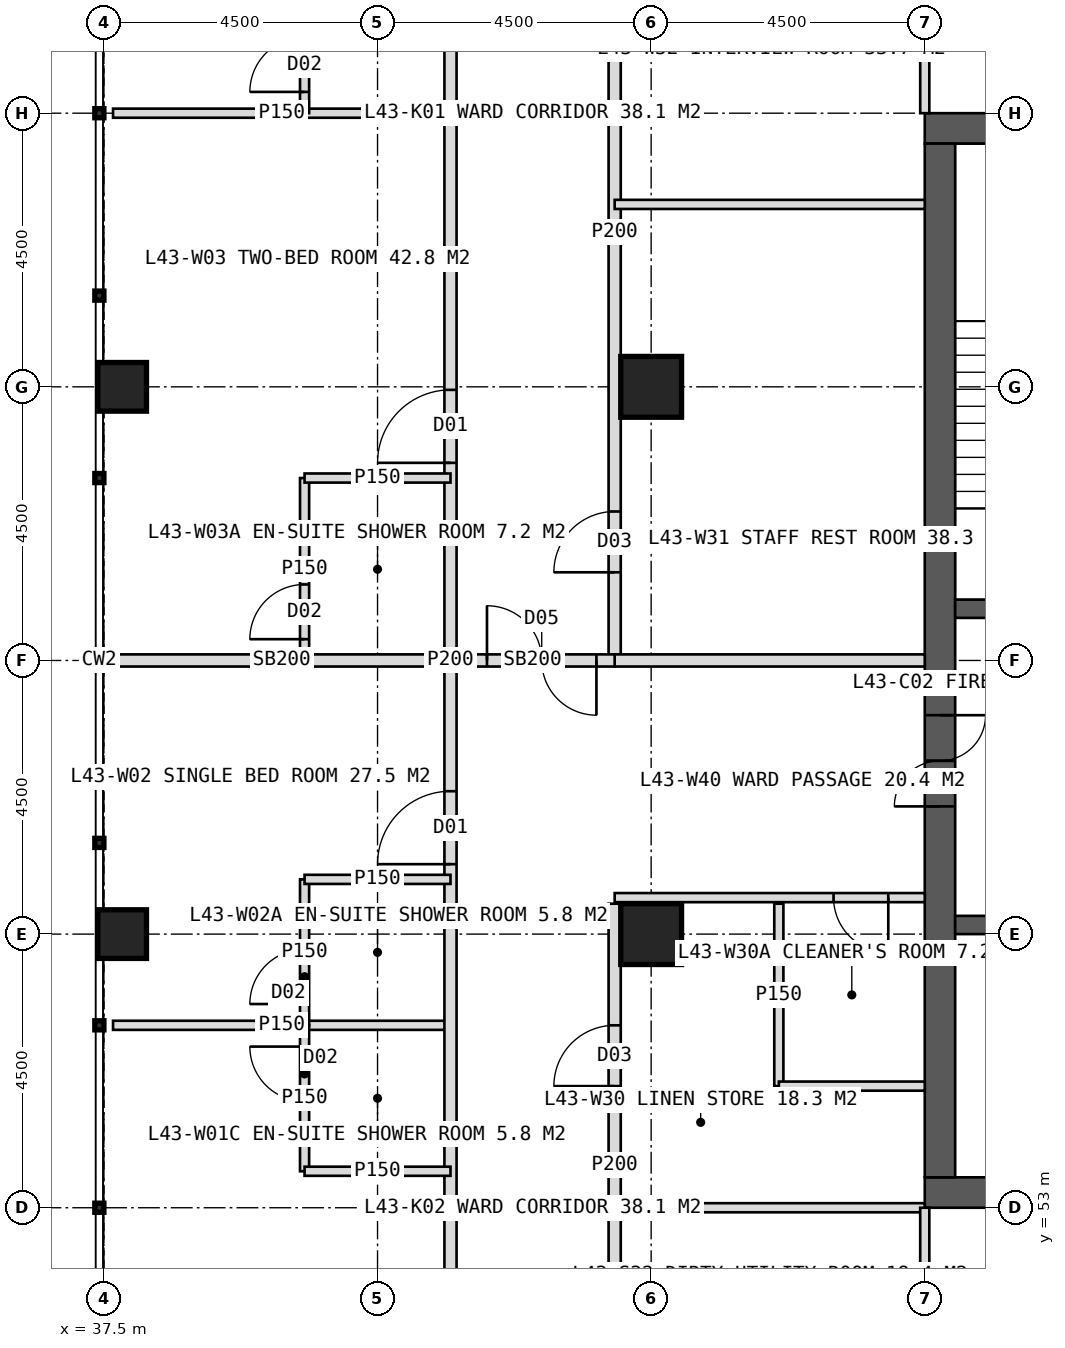
"""IFC4 building model, lengths in metres.
Left out: names, types, materials, properties, quantities, classifications, styles, units other than length and angle.
Written with IfcOpenShell. Run it as: python <this file> out.ifc"""

import sys

from ifc_helpers import new_model, si_unit, direction, frame, frame_2d, origin, origin_2d, place, context, subcontext, project, spatial, rectangle, hollow_rectangle, extrude, element, fill, save


model = new_model("IFC4")
c1 = context("Model", 3, precision=1e-05, world=origin(), true_north=direction((0.0, 1.0)))
c2 = subcontext(c1, "Body", "Model", "MODEL_VIEW")
j1 = project(units=[si_unit("LENGTHUNIT", "METRE"), si_unit("PLANEANGLEUNIT", "RADIAN")], contexts=[c1])
p1 = place(None, origin())
s1 = spatial("IfcSite", under=j1, at=p1, CompositionType="ELEMENT")
p2 = place(p1, origin())
s2 = spatial("IfcBuilding", under=s1, at=p2, CompositionType="ELEMENT")
p3 = place(p2, frame((0.0, 0.0, 181.0)))
s3 = spatial("IfcBuildingStorey", under=s2, at=p3, CompositionType="ELEMENT", Elevation=181.0)
p4 = place(p3, frame((51.0, 70.75, 0.0), z_axis=(0.0, 0.0, 1.0), x_axis=(1.0, 0.0, 0.0)))
e1 = element("IfcWall", 1, at=p4, inside=s3, PredefinedType="SHEAR", context=c2, shape_type="SweptSolid", body=[
    extrude(rectangle(XDim=18.0, YDim=0.5, at=frame_2d((9.0, 0.0))), origin(), (0.0, 0.0, 1.0), 4.0),
])
p5 = place(p4, frame((8.1, 0.0, 0.0)))
e2 = element("IfcOpeningElement", 2, at=p5, cuts=e1, PredefinedType="OPENING", context=c2, shape_type="SweptSolid", body=[
    extrude(rectangle(XDim=1.8, YDim=2.2, at=frame_2d((0.9, 1.1))), frame((0.0, 0.26, 0.0), z_axis=(0.0, -1.0, 0.0), x_axis=(1.0, 0.0, 0.0)), (0.0, 0.0, 1.0), 0.52),
])
p6 = place(p3, frame((51.0, 53.25, 0.0), z_axis=(0.0, 0.0, 1.0), x_axis=(1.0, 0.0, 0.0)))
e3 = element("IfcWall", 3, at=p6, inside=s3, PredefinedType="SHEAR", context=c2, shape_type="SweptSolid", body=[
    extrude(rectangle(XDim=18.0, YDim=0.5, at=frame_2d((9.0, 0.0))), origin(), (0.0, 0.0, 1.0), 4.0),
])
p7 = place(p6, frame((8.1, 0.0, 0.0)))
e4 = element("IfcOpeningElement", 4, at=p7, cuts=e3, PredefinedType="OPENING", context=c2, shape_type="SweptSolid", body=[
    extrude(rectangle(XDim=1.8, YDim=2.2, at=frame_2d((0.9, 1.1))), frame((0.0, 0.26, 0.0), z_axis=(0.0, -1.0, 0.0), x_axis=(1.0, 0.0, 0.0)), (0.0, 0.0, 1.0), 0.52),
])
p8 = place(p3, frame((51.25, 53.5, 0.0), z_axis=(0.0, 0.0, 1.0), x_axis=(0.0, 1.0, 0.0)))
e5 = element("IfcWall", 5, at=p8, inside=s3, PredefinedType="SHEAR", context=c2, shape_type="SweptSolid", body=[
    extrude(rectangle(XDim=17.0, YDim=0.5, at=frame_2d((8.5, 0.0))), origin(), (0.0, 0.0, 1.0), 4.0),
])
p9 = place(p8, frame((6.1, 0.0, 0.0)))
e6 = element("IfcOpeningElement", 6, at=p9, cuts=e5, PredefinedType="OPENING", context=c2, shape_type="SweptSolid", body=[
    extrude(rectangle(XDim=1.5, YDim=2.2, at=frame_2d((0.75, 1.1))), frame((0.0, 0.26, 0.0), z_axis=(0.0, -1.0, 0.0), x_axis=(1.0, 0.0, 0.0)), (0.0, 0.0, 1.0), 0.52),
])
p10 = place(p3, frame((51.5, 62.85, 0.0), z_axis=(0.0, 0.0, 1.0), x_axis=(1.0, 0.0, 0.0)))
e7 = element("IfcWall", 7, at=p10, inside=s3, PredefinedType="SHEAR", context=c2, shape_type="SweptSolid", body=[
    extrude(rectangle(XDim=3.3, YDim=0.3, at=frame_2d((1.65, 0.0))), origin(), (0.0, 0.0, 1.0), 4.0),
])
p11 = place(p10, frame((1.15, 0.0, 0.0)))
e8 = element("IfcOpeningElement", 8, at=p11, cuts=e7, PredefinedType="OPENING", context=c2, shape_type="SweptSolid", body=[
    extrude(rectangle(XDim=1.2, YDim=2.1, at=frame_2d((0.6, 1.05))), frame((0.0, 0.16, 0.0), z_axis=(0.0, -1.0, 0.0), x_axis=(1.0, 0.0, 0.0)), (0.0, 0.0, 1.0), 0.32),
])
p12 = place(p3, frame((51.5, 57.65, 0.0), z_axis=(0.0, 0.0, 1.0), x_axis=(1.0, 0.0, 0.0)))
e9 = element("IfcWall", 9, at=p12, inside=s3, PredefinedType="SHEAR", context=c2, shape_type="SweptSolid", body=[
    extrude(rectangle(XDim=3.3, YDim=0.3, at=frame_2d((1.65, 0.0))), origin(), (0.0, 0.0, 1.0), 4.0),
])
p13 = place(p12, frame((1.15, 0.0, 0.0)))
e10 = element("IfcOpeningElement", 10, at=p13, cuts=e9, PredefinedType="OPENING", context=c2, shape_type="SweptSolid", body=[
    extrude(rectangle(XDim=1.2, YDim=2.2, at=frame_2d((0.6, 1.1))), frame((0.0, 0.16, 0.0), z_axis=(0.0, -1.0, 0.0), x_axis=(1.0, 0.0, 0.0)), (0.0, 0.0, 1.0), 0.32),
])
for number, where, z_axis, x_axis in (
    (11, (46.5, 57.5, 0.0), (0.0, 0.0, 1.0), (1.0, 0.0, 0.0)),
    (12, (46.5, 66.5, 0.0), (0.0, 0.0, 1.0), (1.0, 0.0, 0.0)),
):
    element("IfcColumn", number, at=place(p3, frame(where, z_axis=z_axis, x_axis=x_axis)), inside=s3, PredefinedType="COLUMN", context=c2, shape_type="SweptSolid", body=[
        extrude(hollow_rectangle(XDim=1.0, YDim=1.0, WallThickness=0.1, at=origin_2d()), origin(), (0.0, 0.0, 1.0), 4.0),
    ])
for number, where, z_axis, x_axis in (
    (13, (37.8, 57.5, 0.0), (0.0, 0.0, 1.0), (1.0, 0.0, 0.0)),
    (14, (37.8, 66.5, 0.0), (0.0, 0.0, 1.0), (1.0, 0.0, 0.0)),
):
    element("IfcColumn", number, at=place(p3, frame(where, z_axis=z_axis, x_axis=x_axis)), inside=s3, PredefinedType="COLUMN", context=c2, shape_type="SweptSolid", body=[
        extrude(hollow_rectangle(XDim=0.8, YDim=0.8, WallThickness=0.08, at=origin_2d()), origin(), (0.0, 0.0, 1.0), 4.0),
    ])
p14 = place(p3, frame((51.0, 71.0, 0.0), z_axis=(0.0, 0.0, 1.0), x_axis=(0.0, 1.0, 0.0)))
e15 = element("IfcWall", 15, at=p14, inside=s3, PredefinedType="PARTITIONING", context=c2, shape_type="SweptSolid", body=[
    extrude(rectangle(XDim=5.1, YDim=0.15, at=frame_2d((2.55, 0.0))), origin(), (0.0, 0.0, 1.0), 3.75),
])
p15 = place(p3, frame((43.2, 56.0, 0.0), z_axis=(0.0, 0.0, 1.0), x_axis=(-1.0, 0.0, 0.0)))
e16 = element("IfcWall", 16, at=p15, inside=s3, PredefinedType="PARTITIONING", context=c2, shape_type="SweptSolid", body=[
    extrude(rectangle(XDim=5.55, YDim=0.15, at=frame_2d((2.775, 0.0))), origin(), (0.0, 0.0, 1.0), 3.75),
])
p16 = place(p3, frame((43.2, 62.0, 0.0), z_axis=(0.0, 0.0, 1.0), x_axis=(-1.0, 0.0, 0.0)))
e17 = element("IfcWall", 17, at=p16, inside=s3, PredefinedType="SOLIDWALL", context=c2, shape_type="SweptSolid", body=[
    extrude(rectangle(XDim=5.55, YDim=0.2, at=frame_2d((2.775, 0.0))), origin(), (0.0, 0.0, 1.0), 2.95),
])
p17 = place(p3, frame((43.2, 71.0, 0.0), z_axis=(0.0, 0.0, 1.0), x_axis=(-1.0, 0.0, 0.0)))
e18 = element("IfcWall", 18, at=p17, inside=s3, PredefinedType="PARTITIONING", context=c2, shape_type="SweptSolid", body=[
    extrude(rectangle(XDim=5.55, YDim=0.15, at=frame_2d((2.775, 0.0))), origin(), (0.0, 0.0, 1.0), 3.75),
])
p18 = place(p3, frame((43.2, 45.2, 0.0), z_axis=(0.0, 0.0, 1.0), x_axis=(0.0, 1.0, 0.0)))
e19 = element("IfcWall", 19, at=p18, inside=s3, PredefinedType="PARTITIONING", context=c2, shape_type="SweptSolid", body=[
    extrude(rectangle(XDim=33.6, YDim=0.2, at=frame_2d((16.8, 0.0))), origin(), (0.0, 0.0, 1.0), 3.75),
])
p19 = place(p18, frame((2.65, 0.0, 0.0)))
e20 = element("IfcOpeningElement", 20, at=p19, cuts=e19, PredefinedType="OPENING", context=c2, shape_type="SweptSolid", body=[
    extrude(rectangle(XDim=1.2, YDim=2.2, at=frame_2d((0.6, 1.1))), frame((0.0, 0.11, 0.0), z_axis=(0.0, -1.0, 0.0), x_axis=(1.0, 0.0, 0.0)), (0.0, 0.0, 1.0), 0.22),
])
p20 = place(p18, frame((13.45, 0.0, 0.0)))
e21 = element("IfcOpeningElement", 21, at=p20, cuts=e19, PredefinedType="OPENING", context=c2, shape_type="SweptSolid", body=[
    extrude(rectangle(XDim=1.2, YDim=2.2, at=frame_2d((0.6, 1.1))), frame((0.0, 0.11, 0.0), z_axis=(0.0, -1.0, 0.0), x_axis=(1.0, 0.0, 0.0)), (0.0, 0.0, 1.0), 0.22),
])
p21 = place(p18, frame((20.05, 0.0, 0.0)))
e22 = element("IfcOpeningElement", 22, at=p21, cuts=e19, PredefinedType="OPENING", context=c2, shape_type="SweptSolid", body=[
    extrude(rectangle(XDim=1.2, YDim=2.2, at=frame_2d((0.6, 1.1))), frame((0.0, 0.11, 0.0), z_axis=(0.0, -1.0, 0.0), x_axis=(1.0, 0.0, 0.0)), (0.0, 0.0, 1.0), 0.22),
])
p22 = place(p18, frame((29.05, 0.0, 0.0)))
e23 = element("IfcOpeningElement", 23, at=p22, cuts=e19, PredefinedType="OPENING", context=c2, shape_type="SweptSolid", body=[
    extrude(rectangle(XDim=1.2, YDim=2.2, at=frame_2d((0.6, 1.1))), frame((0.0, 0.11, 0.0), z_axis=(0.0, -1.0, 0.0), x_axis=(1.0, 0.0, 0.0)), (0.0, 0.0, 1.0), 0.22),
])
p23 = place(p3, frame((40.8, 53.6, 0.0), z_axis=(0.0, 0.0, 1.0), x_axis=(0.0, 1.0, 0.0)))
e24 = element("IfcWall", 24, at=p23, inside=s3, PredefinedType="PARTITIONING", context=c2, shape_type="SweptSolid", body=[
    extrude(rectangle(XDim=2.4, YDim=0.15, at=frame_2d((1.2, 0.0))), origin(), (0.0, 0.0, 1.0), 3.75),
])
p24 = place(p23, frame((1.15, 0.0, 0.0)))
e25 = element("IfcOpeningElement", 25, at=p24, cuts=e24, PredefinedType="OPENING", context=c2, shape_type="SweptSolid", body=[
    extrude(rectangle(XDim=0.9, YDim=2.1, at=frame_2d((0.45, 1.05))), frame((0.0, 0.085, 0.0), z_axis=(0.0, -1.0, 0.0), x_axis=(1.0, 0.0, 0.0)), (0.0, 0.0, 1.0), 0.17),
])
p25 = place(p3, frame((43.2, 53.6, 0.0), z_axis=(0.0, 0.0, 1.0), x_axis=(-1.0, 0.0, 0.0)))
e26 = element("IfcWall", 26, at=p25, inside=s3, PredefinedType="PARTITIONING", context=c2, shape_type="SweptSolid", body=[
    extrude(rectangle(XDim=2.4, YDim=0.15, at=frame_2d((1.2, 0.0))), origin(), (0.0, 0.0, 1.0), 3.75),
])
p26 = place(p3, frame((40.8, 56.0, 0.0), z_axis=(0.0, 0.0, 1.0), x_axis=(0.0, 1.0, 0.0)))
e27 = element("IfcWall", 27, at=p26, inside=s3, PredefinedType="PARTITIONING", context=c2, shape_type="SweptSolid", body=[
    extrude(rectangle(XDim=2.4, YDim=0.15, at=frame_2d((1.2, 0.0))), origin(), (0.0, 0.0, 1.0), 3.75),
])
p27 = place(p26, frame((0.35, 0.0, 0.0)))
e28 = element("IfcOpeningElement", 28, at=p27, cuts=e27, PredefinedType="OPENING", context=c2, shape_type="SweptSolid", body=[
    extrude(rectangle(XDim=0.9, YDim=2.1, at=frame_2d((0.45, 1.05))), frame((0.0, 0.085, 0.0), z_axis=(0.0, -1.0, 0.0), x_axis=(1.0, 0.0, 0.0)), (0.0, 0.0, 1.0), 0.17),
])
p28 = place(p3, frame((43.2, 58.4, 0.0), z_axis=(0.0, 0.0, 1.0), x_axis=(-1.0, 0.0, 0.0)))
e29 = element("IfcWall", 29, at=p28, inside=s3, PredefinedType="PARTITIONING", context=c2, shape_type="SweptSolid", body=[
    extrude(rectangle(XDim=2.4, YDim=0.15, at=frame_2d((1.2, 0.0))), origin(), (0.0, 0.0, 1.0), 3.75),
])
p29 = place(p3, frame((40.8, 62.0, 0.0), z_axis=(0.0, 0.0, 1.0), x_axis=(0.0, 1.0, 0.0)))
e30 = element("IfcWall", 30, at=p29, inside=s3, PredefinedType="PARTITIONING", context=c2, shape_type="SweptSolid", body=[
    extrude(rectangle(XDim=3.0, YDim=0.15, at=frame_2d((1.5, 0.0))), origin(), (0.0, 0.0, 1.0), 3.75),
])
p30 = place(p29, frame((0.35, 0.0, 0.0)))
e31 = element("IfcOpeningElement", 31, at=p30, cuts=e30, PredefinedType="OPENING", context=c2, shape_type="SweptSolid", body=[
    extrude(rectangle(XDim=0.9, YDim=2.1, at=frame_2d((0.45, 1.05))), frame((0.0, 0.085, 0.0), z_axis=(0.0, -1.0, 0.0), x_axis=(1.0, 0.0, 0.0)), (0.0, 0.0, 1.0), 0.17),
])
p31 = place(p3, frame((43.2, 65.0, 0.0), z_axis=(0.0, 0.0, 1.0), x_axis=(-1.0, 0.0, 0.0)))
e32 = element("IfcWall", 32, at=p31, inside=s3, PredefinedType="PARTITIONING", context=c2, shape_type="SweptSolid", body=[
    extrude(rectangle(XDim=2.4, YDim=0.15, at=frame_2d((1.2, 0.0))), origin(), (0.0, 0.0, 1.0), 3.75),
])
p32 = place(p3, frame((40.8, 71.0, 0.0), z_axis=(0.0, 0.0, 1.0), x_axis=(0.0, 1.0, 0.0)))
e33 = element("IfcWall", 33, at=p32, inside=s3, PredefinedType="PARTITIONING", context=c2, shape_type="SweptSolid", body=[
    extrude(rectangle(XDim=3.0, YDim=0.15, at=frame_2d((1.5, 0.0))), origin(), (0.0, 0.0, 1.0), 3.75),
])
p33 = place(p32, frame((0.35, 0.0, 0.0)))
e34 = element("IfcOpeningElement", 34, at=p33, cuts=e33, PredefinedType="OPENING", context=c2, shape_type="SweptSolid", body=[
    extrude(rectangle(XDim=0.9, YDim=2.1, at=frame_2d((0.45, 1.05))), frame((0.0, 0.085, 0.0), z_axis=(0.0, -1.0, 0.0), x_axis=(1.0, 0.0, 0.0)), (0.0, 0.0, 1.0), 0.17),
])
p34 = place(p3, frame((51.0, 53.0, 0.0), z_axis=(0.0, 0.0, 1.0), x_axis=(-1.0, 0.0, 0.0)))
e35 = element("IfcWall", 35, at=p34, inside=s3, PredefinedType="PARTITIONING", context=c2, shape_type="SweptSolid", body=[
    extrude(rectangle(XDim=5.1, YDim=0.15, at=frame_2d((2.55, 0.0))), origin(), (0.0, 0.0, 1.0), 3.75),
])
p35 = place(p3, frame((45.9, 49.4, 0.0), z_axis=(0.0, 0.0, 1.0), x_axis=(0.0, 1.0, 0.0)))
e36 = element("IfcWall", 36, at=p35, inside=s3, PredefinedType="PARTITIONING", context=c2, shape_type="SweptSolid", body=[
    extrude(rectangle(XDim=8.6, YDim=0.2, at=frame_2d((4.3, 0.0))), origin(), (0.0, 0.0, 1.0), 3.75),
])
p36 = place(p35, frame((5.6, 0.0, 0.0)))
e37 = element("IfcOpeningElement", 37, at=p36, cuts=e36, PredefinedType="OPENING", context=c2, shape_type="SweptSolid", body=[
    extrude(rectangle(XDim=1.0, YDim=2.1, at=frame_2d((0.5, 1.05))), frame((0.0, 0.11, 0.0), z_axis=(0.0, -1.0, 0.0), x_axis=(1.0, 0.0, 0.0)), (0.0, 0.0, 1.0), 0.22),
])
p37 = place(p3, frame((45.9, 62.0, 0.0), z_axis=(0.0, 0.0, 1.0), x_axis=(0.0, 1.0, 0.0)))
e38 = element("IfcWall", 38, at=p37, inside=s3, PredefinedType="PARTITIONING", context=c2, shape_type="SweptSolid", body=[
    extrude(rectangle(XDim=14.1, YDim=0.2, at=frame_2d((7.05, 0.0))), origin(), (0.0, 0.0, 1.0), 3.75),
])
p38 = place(p37, frame((1.45, 0.0, 0.0)))
e39 = element("IfcOpeningElement", 39, at=p38, cuts=e38, PredefinedType="OPENING", context=c2, shape_type="SweptSolid", body=[
    extrude(rectangle(XDim=1.0, YDim=2.1, at=frame_2d((0.5, 1.05))), frame((0.0, 0.11, 0.0), z_axis=(0.0, -1.0, 0.0), x_axis=(1.0, 0.0, 0.0)), (0.0, 0.0, 1.0), 0.22),
])
p39 = place(p37, frame((10.3, 0.0, 0.0)))
e40 = element("IfcOpeningElement", 40, at=p39, cuts=e38, PredefinedType="OPENING", context=c2, shape_type="SweptSolid", body=[
    extrude(rectangle(XDim=1.0, YDim=2.1, at=frame_2d((0.5, 1.05))), frame((0.0, 0.11, 0.0), z_axis=(0.0, -1.0, 0.0), x_axis=(1.0, 0.0, 0.0)), (0.0, 0.0, 1.0), 0.22),
])
p40 = place(p3, frame((51.0, 58.1, 0.0), z_axis=(0.0, 0.0, 1.0), x_axis=(-1.0, 0.0, 0.0)))
e41 = element("IfcWall", 41, at=p40, inside=s3, PredefinedType="PARTITIONING", context=c2, shape_type="SweptSolid", body=[
    extrude(rectangle(XDim=5.1, YDim=0.15, at=frame_2d((2.55, 0.0))), origin(), (0.0, 0.0, 1.0), 3.75),
])
p41 = place(p40, frame((0.6, 0.0, 0.0)))
e42 = element("IfcOpeningElement", 42, at=p41, cuts=e41, PredefinedType="OPENING", context=c2, shape_type="SweptSolid", body=[
    extrude(rectangle(XDim=0.9, YDim=2.1, at=frame_2d((0.45, 1.05))), frame((0.0, 0.085, 0.0), z_axis=(0.0, -1.0, 0.0), x_axis=(1.0, 0.0, 0.0)), (0.0, 0.0, 1.0), 0.17),
])
p42 = place(p3, frame((51.0, 62.0, 0.0), z_axis=(0.0, 0.0, 1.0), x_axis=(-1.0, 0.0, 0.0)))
e43 = element("IfcWall", 43, at=p42, inside=s3, PredefinedType="SOLIDWALL", context=c2, shape_type="SweptSolid", body=[
    extrude(rectangle(XDim=5.1, YDim=0.2, at=frame_2d((2.55, 0.0))), origin(), (0.0, 0.0, 1.0), 2.95),
])
p43 = place(p3, frame((51.0, 69.5, 0.0), z_axis=(0.0, 0.0, 1.0), x_axis=(-1.0, 0.0, 0.0)))
e44 = element("IfcWall", 44, at=p43, inside=s3, PredefinedType="PARTITIONING", context=c2, shape_type="SweptSolid", body=[
    extrude(rectangle(XDim=5.1, YDim=0.15, at=frame_2d((2.55, 0.0))), origin(), (0.0, 0.0, 1.0), 3.75),
])
p44 = place(p3, frame((48.6, 55.0, 0.0), z_axis=(0.0, 0.0, 1.0), x_axis=(0.0, 1.0, 0.0)))
e45 = element("IfcWall", 45, at=p44, inside=s3, PredefinedType="PARTITIONING", context=c2, shape_type="SweptSolid", body=[
    extrude(rectangle(XDim=3.0, YDim=0.15, at=frame_2d((1.5, 0.0))), origin(), (0.0, 0.0, 1.0), 3.75),
])
p45 = place(p3, frame((51.0, 55.0, 0.0), z_axis=(0.0, 0.0, 1.0), x_axis=(-1.0, 0.0, 0.0)))
e46 = element("IfcWall", 46, at=p45, inside=s3, PredefinedType="PARTITIONING", context=c2, shape_type="SweptSolid", body=[
    extrude(rectangle(XDim=2.4, YDim=0.15, at=frame_2d((1.2, 0.0))), origin(), (0.0, 0.0, 1.0), 3.75),
])
p46 = place(p3, frame((51.0, 53.0, 0.0), z_axis=(0.0, 0.0, 1.0), x_axis=(0.0, -1.0, 0.0)))
e47 = element("IfcWall", 47, at=p46, inside=s3, PredefinedType="PARTITIONING", context=c2, shape_type="SweptSolid", body=[
    extrude(rectangle(XDim=3.6, YDim=0.15, at=frame_2d((1.8, 0.0))), origin(), (0.0, 0.0, 1.0), 3.75),
])
p47 = place(p3, frame((45.9, 62.0, 0.0), z_axis=(0.0, 0.0, 1.0), x_axis=(-1.0, 0.0, 0.0)))
e48 = element("IfcWall", 48, at=p47, inside=s3, PredefinedType="SOLIDWALL", context=c2, shape_type="SweptSolid", body=[
    extrude(rectangle(XDim=2.7, YDim=0.2, at=frame_2d((1.35, 0.0))), origin(), (0.0, 0.0, 1.0), 2.95),
])
p48 = place(p47, frame((0.3, 0.0, 0.0)))
e49 = element("IfcOpeningElement", 49, at=p48, cuts=e48, PredefinedType="OPENING", context=c2, shape_type="SweptSolid", body=[
    extrude(rectangle(XDim=1.8, YDim=2.2, at=frame_2d((0.9, 1.1))), frame((0.0, 0.11, 0.0), z_axis=(0.0, -1.0, 0.0), x_axis=(1.0, 0.0, 0.0)), (0.0, 0.0, 1.0), 0.22),
])
p49 = place(p24, origin())
e50 = element("IfcDoor", 50, at=p49, inside=s3, OperationType="SINGLE_SWING_RIGHT", PredefinedType="DOOR", context=c2, shape_type="SweptSolid", body=[
    extrude(rectangle(XDim=0.9, YDim=2.1, at=frame_2d((0.45, 1.05))), frame((0.0, 0.025, 0.0), z_axis=(0.0, -1.0, 0.0), x_axis=(1.0, 0.0, 0.0)), (0.0, 0.0, 1.0), 0.05),
])
fill(e25, e50)
p50 = place(p20, origin())
e51 = element("IfcDoor", 51, at=p50, inside=s3, OperationType="SINGLE_SWING_LEFT", PredefinedType="DOOR", context=c2, shape_type="SweptSolid", body=[
    extrude(rectangle(XDim=1.2, YDim=2.2, at=frame_2d((0.6, 1.1))), frame((0.0, 0.025, 0.0), z_axis=(0.0, -1.0, 0.0), x_axis=(1.0, 0.0, 0.0)), (0.0, 0.0, 1.0), 0.05),
])
fill(e21, e51)
p51 = place(p27, origin())
e52 = element("IfcDoor", 52, at=p51, inside=s3, OperationType="SINGLE_SWING_LEFT", PredefinedType="DOOR", context=c2, shape_type="SweptSolid", body=[
    extrude(rectangle(XDim=0.9, YDim=2.1, at=frame_2d((0.45, 1.05))), frame((0.0, 0.025, 0.0), z_axis=(0.0, -1.0, 0.0), x_axis=(1.0, 0.0, 0.0)), (0.0, 0.0, 1.0), 0.05),
])
fill(e28, e52)
p52 = place(p21, origin())
e53 = element("IfcDoor", 53, at=p52, inside=s3, OperationType="SINGLE_SWING_LEFT", PredefinedType="DOOR", context=c2, shape_type="SweptSolid", body=[
    extrude(rectangle(XDim=1.2, YDim=2.2, at=frame_2d((0.6, 1.1))), frame((0.0, 0.025, 0.0), z_axis=(0.0, -1.0, 0.0), x_axis=(1.0, 0.0, 0.0)), (0.0, 0.0, 1.0), 0.05),
])
fill(e22, e53)
p53 = place(p30, origin())
e54 = element("IfcDoor", 54, at=p53, inside=s3, OperationType="SINGLE_SWING_LEFT", PredefinedType="DOOR", context=c2, shape_type="SweptSolid", body=[
    extrude(rectangle(XDim=0.9, YDim=2.1, at=frame_2d((0.45, 1.05))), frame((0.0, 0.025, 0.0), z_axis=(0.0, -1.0, 0.0), x_axis=(1.0, 0.0, 0.0)), (0.0, 0.0, 1.0), 0.05),
])
fill(e31, e54)
p54 = place(p33, origin())
e55 = element("IfcDoor", 55, at=p54, inside=s3, OperationType="SINGLE_SWING_LEFT", PredefinedType="DOOR", context=c2, shape_type="SweptSolid", body=[
    extrude(rectangle(XDim=0.9, YDim=2.1, at=frame_2d((0.45, 1.05))), frame((0.0, 0.025, 0.0), z_axis=(0.0, -1.0, 0.0), x_axis=(1.0, 0.0, 0.0)), (0.0, 0.0, 1.0), 0.05),
])
fill(e34, e55)
p55 = place(p41, origin())
e56 = element("IfcDoor", 56, at=p55, inside=s3, OperationType="SINGLE_SWING_LEFT", PredefinedType="DOOR", context=c2, shape_type="SweptSolid", body=[
    extrude(rectangle(XDim=0.9, YDim=2.1, at=frame_2d((0.45, 1.05))), frame((0.0, 0.025, 0.0), z_axis=(0.0, -1.0, 0.0), x_axis=(1.0, 0.0, 0.0)), (0.0, 0.0, 1.0), 0.05),
])
fill(e42, e56)
p56 = place(p36, origin())
e57 = element("IfcDoor", 57, at=p56, inside=s3, OperationType="SINGLE_SWING_LEFT", PredefinedType="DOOR", context=c2, shape_type="SweptSolid", body=[
    extrude(rectangle(XDim=1.0, YDim=2.1, at=frame_2d((0.5, 1.05))), frame((0.0, 0.025, 0.0), z_axis=(0.0, -1.0, 0.0), x_axis=(1.0, 0.0, 0.0)), (0.0, 0.0, 1.0), 0.05),
])
fill(e37, e57)
p57 = place(p38, origin())
e58 = element("IfcDoor", 58, at=p57, inside=s3, OperationType="SINGLE_SWING_LEFT", PredefinedType="DOOR", context=c2, shape_type="SweptSolid", body=[
    extrude(rectangle(XDim=1.0, YDim=2.1, at=frame_2d((0.5, 1.05))), frame((0.0, 0.025, 0.0), z_axis=(0.0, -1.0, 0.0), x_axis=(1.0, 0.0, 0.0)), (0.0, 0.0, 1.0), 0.05),
])
fill(e39, e58)
p58 = place(p48, origin())
e59 = element("IfcDoor", 59, at=p58, inside=s3, OperationType="DOUBLE_DOOR_DOUBLE_SWING", PredefinedType="DOOR", context=c2, shape_type="SweptSolid", body=[
    extrude(rectangle(XDim=1.8, YDim=2.2, at=frame_2d((0.9, 1.1))), frame((0.0, 0.025, 0.0), z_axis=(0.0, -1.0, 0.0), x_axis=(1.0, 0.0, 0.0)), (0.0, 0.0, 1.0), 0.05),
])
fill(e49, e59)
p59 = place(p9, origin())
e60 = element("IfcDoor", 60, at=p59, inside=s3, OperationType="DOUBLE_DOOR_SINGLE_SWING", PredefinedType="DOOR", context=c2, shape_type="SweptSolid", body=[
    extrude(rectangle(XDim=1.5, YDim=2.2, at=frame_2d((0.75, 1.1))), frame((0.0, 0.025, 0.0), z_axis=(0.0, -1.0, 0.0), x_axis=(1.0, 0.0, 0.0)), (0.0, 0.0, 1.0), 0.05),
])
fill(e6, e60)
save(model, sys.argv[1])
